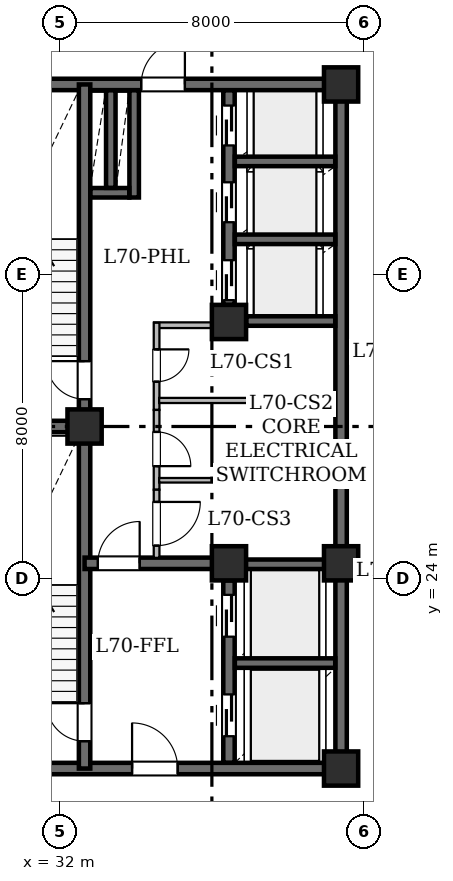
"""IFC4 building model, lengths in metres.
Left out: names, types, materials, properties, quantities, classifications, styles, units other than length and angle.
Written with IfcOpenShell. Run it as: python <this file> out.ifc"""

import sys

from ifc_helpers import new_model, si_unit, direction, frame, frame_2d, origin, origin_2d, place, context, subcontext, project, spatial, rectangle, hollow_rectangle, extrude, element, fill, save


model = new_model("IFC4")
c1 = context("Model", 3, precision=1e-05, world=origin(), true_north=direction((0.0, 1.0)))
c2 = subcontext(c1, "Body", "Model", "MODEL_VIEW")
j1 = project(units=[si_unit("LENGTHUNIT", "METRE"), si_unit("PLANEANGLEUNIT", "RADIAN")], contexts=[c1])
p1 = place(None, origin())
s1 = spatial("IfcSite", under=j1, at=p1, CompositionType="ELEMENT")
p2 = place(p1, origin())
s2 = spatial("IfcBuilding", under=s1, at=p2, CompositionType="ELEMENT")
p3 = place(p2, frame((0.0, 0.0, 273.65)))
s3 = spatial("IfcBuildingStorey", under=s2, at=p3, CompositionType="ELEMENT", Elevation=273.65)
for number, where, z_axis, x_axis in (
    (1, (32.65, 28.0, 0.0), (0.0, 0.0, 1.0), (1.0, 0.0, 0.0)),
    (2, (39.4, 19.0, 0.0), (0.0, 0.0, 1.0), (1.0, 0.0, 0.0)),
    (3, (36.45, 24.4, 0.0), (0.0, 0.0, 1.0), (1.0, 0.0, 0.0)),
    (4, (39.4, 24.4, 0.0), (0.0, 0.0, 1.0), (1.0, 0.0, 0.0)),
    (5, (36.45, 30.75, 0.0), (0.0, 0.0, 1.0), (1.0, 0.0, 0.0)),
    (6, (39.4, 37.0, 0.0), (0.0, 0.0, 1.0), (1.0, 0.0, 0.0)),
):
    element("IfcColumn", number, at=place(p3, frame(where, z_axis=z_axis, x_axis=x_axis)), inside=s3, PredefinedType="COLUMN", context=c2, shape_type="SweptSolid", body=[
        extrude(hollow_rectangle(XDim=0.9, YDim=0.9, WallThickness=0.045, at=origin_2d()), origin(), (0.0, 0.0, 1.0), 4.2),
    ])
p4 = place(p3, frame((29.0, 19.0, 0.0), z_axis=(0.0, 0.0, 1.0), x_axis=(1.0, 0.0, 0.0)))
e7 = element("IfcWall", 7, at=p4, inside=s3, PredefinedType="SHEAR", context=c2, shape_type="SweptSolid", body=[
    extrude(rectangle(XDim=10.4, YDim=0.3, at=frame_2d((5.2, 0.0))), origin(), (0.0, 0.0, 1.0), 3.78),
])
p5 = place(p4, frame((4.9, 0.0, 0.0)))
e8 = element("IfcOpeningElement", 8, at=p5, cuts=e7, PredefinedType="OPENING", context=c2, shape_type="SweptSolid", body=[
    extrude(rectangle(XDim=1.2, YDim=2.15, at=frame_2d((0.6, 1.075))), frame((0.0, 0.16, 0.0), z_axis=(0.0, -1.0, 0.0), x_axis=(1.0, 0.0, 0.0)), (0.0, 0.0, 1.0), 0.32),
])
p6 = place(p3, frame((29.0, 37.0, 0.0), z_axis=(0.0, 0.0, 1.0), x_axis=(1.0, 0.0, 0.0)))
e9 = element("IfcWall", 9, at=p6, inside=s3, PredefinedType="SHEAR", context=c2, shape_type="SweptSolid", body=[
    extrude(rectangle(XDim=10.4, YDim=0.3, at=frame_2d((5.2, 0.0))), origin(), (0.0, 0.0, 1.0), 3.78),
])
p7 = place(p6, frame((5.14, 0.0, 0.0)))
e10 = element("IfcOpeningElement", 10, at=p7, cuts=e9, PredefinedType="OPENING", context=c2, shape_type="SweptSolid", body=[
    extrude(rectangle(XDim=1.15, YDim=2.2, at=frame_2d((0.575, 1.1))), frame((0.0, 0.16, 0.0), z_axis=(0.0, -1.0, 0.0), x_axis=(1.0, 0.0, 0.0)), (0.0, 0.0, 1.0), 0.32),
])
p8 = place(p3, frame((39.4, 19.0, 0.0), z_axis=(0.0, 0.0, 1.0), x_axis=(0.0, 1.0, 0.0)))
e11 = element("IfcWall", 11, at=p8, inside=s3, PredefinedType="SHEAR", context=c2, shape_type="SweptSolid", body=[
    extrude(rectangle(XDim=5.4, YDim=0.3, at=frame_2d((2.7, 0.0))), origin(), (0.0, 0.0, 1.0), 3.78),
])
p9 = place(p3, frame((39.4, 24.4, 0.0), z_axis=(0.0, 0.0, 1.0), x_axis=(0.0, 1.0, 0.0)))
e12 = element("IfcWall", 12, at=p9, inside=s3, PredefinedType="SHEAR", context=c2, shape_type="SweptSolid", body=[
    extrude(rectangle(XDim=12.6, YDim=0.3, at=frame_2d((6.3, 0.0))), origin(), (0.0, 0.0, 1.0), 3.78),
])
p10 = place(p3, frame((32.65, 19.0, 0.0), z_axis=(0.0, 0.0, 1.0), x_axis=(0.0, 1.0, 0.0)))
e13 = element("IfcWall", 13, at=p10, inside=s3, PredefinedType="SHEAR", context=c2, shape_type="SweptSolid", body=[
    extrude(rectangle(XDim=9.0, YDim=0.3, at=frame_2d((4.5, 0.0))), origin(), (0.0, 0.0, 1.0), 3.78),
])
p11 = place(p10, frame((0.72, 0.0, 0.0)))
e14 = element("IfcOpeningElement", 14, at=p11, cuts=e13, PredefinedType="OPENING", context=c2, shape_type="SweptSolid", body=[
    extrude(rectangle(XDim=1.0, YDim=2.15, at=frame_2d((0.5, 1.075))), frame((0.0, 0.16, 0.0), z_axis=(0.0, -1.0, 0.0), x_axis=(1.0, 0.0, 0.0)), (0.0, 0.0, 1.0), 0.32),
])
p12 = place(p3, frame((32.65, 28.0, 0.0), z_axis=(0.0, 0.0, 1.0), x_axis=(0.0, 1.0, 0.0)))
e15 = element("IfcWall", 15, at=p12, inside=s3, PredefinedType="SHEAR", context=c2, shape_type="SweptSolid", body=[
    extrude(rectangle(XDim=9.0, YDim=0.3, at=frame_2d((4.5, 0.0))), origin(), (0.0, 0.0, 1.0), 3.78),
])
p13 = place(p12, frame((0.72, 0.0, 0.0)))
e16 = element("IfcOpeningElement", 16, at=p13, cuts=e15, PredefinedType="OPENING", context=c2, shape_type="SweptSolid", body=[
    extrude(rectangle(XDim=1.0, YDim=2.15, at=frame_2d((0.5, 1.075))), frame((0.0, 0.16, 0.0), z_axis=(0.0, -1.0, 0.0), x_axis=(1.0, 0.0, 0.0)), (0.0, 0.0, 1.0), 0.32),
])
p14 = place(p3, frame((29.0, 28.0, 0.0), z_axis=(0.0, 0.0, 1.0), x_axis=(1.0, 0.0, 0.0)))
e17 = element("IfcWall", 17, at=p14, inside=s3, PredefinedType="SHEAR", context=c2, shape_type="SweptSolid", body=[
    extrude(rectangle(XDim=3.65, YDim=0.3, at=frame_2d((1.825, 0.0))), origin(), (0.0, 0.0, 1.0), 3.78),
])
p15 = place(p3, frame((32.65, 24.4, 0.0), z_axis=(0.0, 0.0, 1.0), x_axis=(1.0, 0.0, 0.0)))
e18 = element("IfcWall", 18, at=p15, inside=s3, PredefinedType="SHEAR", context=c2, shape_type="SweptSolid", body=[
    extrude(rectangle(XDim=3.8, YDim=0.3, at=frame_2d((1.9, 0.0))), origin(), (0.0, 0.0, 1.0), 3.78),
])
p16 = place(p15, frame((0.35, 0.0, 0.0)))
e19 = element("IfcOpeningElement", 19, at=p16, cuts=e18, PredefinedType="OPENING", context=c2, shape_type="SweptSolid", body=[
    extrude(rectangle(XDim=1.1, YDim=2.15, at=frame_2d((0.55, 1.075))), frame((0.0, 0.16, 0.0), z_axis=(0.0, -1.0, 0.0), x_axis=(1.0, 0.0, 0.0)), (0.0, 0.0, 1.0), 0.32),
])
p17 = place(p3, frame((36.45, 19.154, 0.0), z_axis=(0.0, 0.0, 1.0), x_axis=(0.0, 1.0, 0.0)))
e20 = element("IfcWall", 20, at=p17, inside=s3, PredefinedType="SHEAR", context=c2, shape_type="SweptSolid", body=[
    extrude(rectangle(XDim=4.796, YDim=0.3, at=frame_2d((2.398, 0.0))), origin(), (0.0, 0.0, 1.0), 3.78),
])
p18 = place(p17, frame((0.696, 0.0, 0.0)))
e21 = element("IfcOpeningElement", 21, at=p18, cuts=e20, PredefinedType="OPENING", context=c2, shape_type="SweptSolid", body=[
    extrude(rectangle(XDim=1.1, YDim=2.15, at=frame_2d((0.55, 1.075))), frame((0.0, 0.16, 0.0), z_axis=(0.0, -1.0, 0.0), x_axis=(1.0, 0.0, 0.0)), (0.0, 0.0, 1.0), 0.32),
])
p19 = place(p17, frame((3.316, 0.0, 0.0)))
e22 = element("IfcOpeningElement", 22, at=p19, cuts=e20, PredefinedType="OPENING", context=c2, shape_type="SweptSolid", body=[
    extrude(rectangle(XDim=1.1, YDim=2.15, at=frame_2d((0.55, 1.075))), frame((0.0, 0.16, 0.0), z_axis=(0.0, -1.0, 0.0), x_axis=(1.0, 0.0, 0.0)), (0.0, 0.0, 1.0), 0.32),
])
p20 = place(p3, frame((36.45, 31.2, 0.0), z_axis=(0.0, 0.0, 1.0), x_axis=(0.0, 1.0, 0.0)))
e23 = element("IfcWall", 23, at=p20, inside=s3, PredefinedType="SHEAR", context=c2, shape_type="SweptSolid", body=[
    extrude(rectangle(XDim=5.646, YDim=0.3, at=frame_2d((2.823, 0.0))), origin(), (0.0, 0.0, 1.0), 3.78),
])
p21 = place(p20, frame((0.125, 0.0, 0.0)))
e24 = element("IfcOpeningElement", 24, at=p21, cuts=e23, PredefinedType="OPENING", context=c2, shape_type="SweptSolid", body=[
    extrude(rectangle(XDim=1.05, YDim=2.15, at=frame_2d((0.525, 1.075))), frame((0.0, 0.16, 0.0), z_axis=(0.0, -1.0, 0.0), x_axis=(1.0, 0.0, 0.0)), (0.0, 0.0, 1.0), 0.32),
])
p22 = place(p20, frame((2.175, 0.0, 0.0)))
e25 = element("IfcOpeningElement", 25, at=p22, cuts=e23, PredefinedType="OPENING", context=c2, shape_type="SweptSolid", body=[
    extrude(rectangle(XDim=1.05, YDim=2.15, at=frame_2d((0.525, 1.075))), frame((0.0, 0.16, 0.0), z_axis=(0.0, -1.0, 0.0), x_axis=(1.0, 0.0, 0.0)), (0.0, 0.0, 1.0), 0.32),
])
p23 = place(p20, frame((4.195, 0.0, 0.0)))
e26 = element("IfcOpeningElement", 26, at=p23, cuts=e23, PredefinedType="OPENING", context=c2, shape_type="SweptSolid", body=[
    extrude(rectangle(XDim=1.05, YDim=2.15, at=frame_2d((0.525, 1.075))), frame((0.0, 0.16, 0.0), z_axis=(0.0, -1.0, 0.0), x_axis=(1.0, 0.0, 0.0)), (0.0, 0.0, 1.0), 0.32),
])
for number, where, z_axis, x_axis in (
    (27, (36.604, 21.775, 0.0), (0.0, 0.0, 1.0), (1.0, 0.0, 0.0)),
    (28, (36.604, 24.375, 0.0), (0.0, 0.0, 1.0), (1.0, 0.0, 0.0)),
):
    element("IfcWall", number, at=place(p3, frame(where, z_axis=z_axis, x_axis=x_axis)), inside=s3, PredefinedType="SHEAR", context=c2, shape_type="SweptSolid", body=[
        extrude(rectangle(XDim=2.642, YDim=0.25, at=frame_2d((1.321, 0.0))), origin(), (0.0, 0.0, 1.0), 3.78),
    ])
p24 = place(p3, frame((36.904, 30.775, 0.0), z_axis=(0.0, 0.0, 1.0), x_axis=(1.0, 0.0, 0.0)))
e29 = element("IfcWall", 29, at=p24, inside=s3, PredefinedType="SHEAR", context=c2, shape_type="SweptSolid", body=[
    extrude(rectangle(XDim=2.342, YDim=0.25, at=frame_2d((1.171, 0.0))), origin(), (0.0, 0.0, 1.0), 3.78),
])
for number, where, z_axis, x_axis in (
    (30, (36.604, 32.925, 0.0), (0.0, 0.0, 1.0), (1.0, 0.0, 0.0)),
    (31, (36.604, 34.975, 0.0), (0.0, 0.0, 1.0), (1.0, 0.0, 0.0)),
):
    element("IfcWall", number, at=place(p3, frame(where, z_axis=z_axis, x_axis=x_axis)), inside=s3, PredefinedType="SHEAR", context=c2, shape_type="SweptSolid", body=[
        extrude(rectangle(XDim=2.642, YDim=0.25, at=frame_2d((1.321, 0.0))), origin(), (0.0, 0.0, 1.0), 3.78),
    ])
p25 = place(p3, frame((33.955, 34.025, 0.0), z_axis=(0.0, 0.0, 1.0), x_axis=(0.0, 1.0, 0.0)))
e32 = element("IfcWall", 32, at=p25, inside=s3, PredefinedType="SHEAR", context=c2, shape_type="SweptSolid", body=[
    extrude(rectangle(XDim=2.821, YDim=0.25, at=frame_2d((1.411, 0.0))), origin(), (0.0, 0.0, 1.0), 3.78),
])
p26 = place(p3, frame((32.804, 34.15, 0.0), z_axis=(0.0, 0.0, 1.0), x_axis=(1.0, 0.0, 0.0)))
e33 = element("IfcWall", 33, at=p26, inside=s3, PredefinedType="SHEAR", context=c2, shape_type="SweptSolid", body=[
    extrude(rectangle(XDim=1.022, YDim=0.25, at=frame_2d((0.511, 0.0))), origin(), (0.0, 0.0, 1.0), 3.78),
])
p27 = place(p3, frame((33.34, 34.279, 0.0), z_axis=(0.0, 0.0, 1.0), x_axis=(0.0, 1.0, 0.0)))
e34 = element("IfcWall", 34, at=p27, inside=s3, PredefinedType="SHEAR", context=c2, shape_type="SweptSolid", body=[
    extrude(rectangle(XDim=2.567, YDim=0.25, at=frame_2d((1.283, 0.0))), origin(), (0.0, 0.0, 1.0), 3.78),
])
p28 = place(p3, frame((36.3, 30.665, 0.0), z_axis=(0.0, 0.0, 1.0), x_axis=(-1.0, 0.0, 0.0)))
e35 = element("IfcWall", 35, at=p28, inside=s3, PredefinedType="STANDARD", context=c2, shape_type="SweptSolid", body=[
    extrude(rectangle(XDim=1.82, YDim=0.15, at=frame_2d((0.91, 0.0))), origin(), (0.0, 0.0, 1.0), 3.78),
])
p29 = place(p3, frame((34.545, 30.73, 0.0), z_axis=(0.0, 0.0, 1.0), x_axis=(0.0, -1.0, 0.0)))
e36 = element("IfcWall", 36, at=p29, inside=s3, PredefinedType="STANDARD", context=c2, shape_type="SweptSolid", body=[
    extrude(rectangle(XDim=2.294, YDim=0.15, at=frame_2d((1.147, 0.0))), origin(), (0.0, 0.0, 1.0), 3.78),
])
p30 = place(p29, frame((0.701, 0.0, 0.0)))
e37 = element("IfcOpeningElement", 37, at=p30, cuts=e36, PredefinedType="OPENING", context=c2, shape_type="SweptSolid", body=[
    extrude(rectangle(XDim=0.85, YDim=2.1, at=frame_2d((0.425, 1.05))), frame((0.0, 0.085, 0.0), z_axis=(0.0, -1.0, 0.0), x_axis=(1.0, 0.0, 0.0)), (0.0, 0.0, 1.0), 0.17),
])
p31 = place(p3, frame((34.545, 28.436, 0.0), z_axis=(0.0, 0.0, 1.0), x_axis=(0.0, -1.0, 0.0)))
e38 = element("IfcWall", 38, at=p31, inside=s3, PredefinedType="STANDARD", context=c2, shape_type="SweptSolid", body=[
    extrude(rectangle(XDim=2.1, YDim=0.15, at=frame_2d((1.05, 0.0))), origin(), (0.0, 0.0, 1.0), 3.78),
])
p32 = place(p31, frame((0.579, 0.0, 0.0)))
e39 = element("IfcOpeningElement", 39, at=p32, cuts=e38, PredefinedType="OPENING", context=c2, shape_type="SweptSolid", body=[
    extrude(rectangle(XDim=0.9, YDim=2.1, at=frame_2d((0.45, 1.05))), frame((0.0, 0.085, 0.0), z_axis=(0.0, -1.0, 0.0), x_axis=(1.0, 0.0, 0.0)), (0.0, 0.0, 1.0), 0.17),
])
p33 = place(p3, frame((34.545, 26.336, 0.0), z_axis=(0.0, 0.0, 1.0), x_axis=(0.0, -1.0, 0.0)))
e40 = element("IfcWall", 40, at=p33, inside=s3, PredefinedType="STANDARD", context=c2, shape_type="SweptSolid", body=[
    extrude(rectangle(XDim=1.792, YDim=0.15, at=frame_2d((0.896, 0.0))), origin(), (0.0, 0.0, 1.0), 3.78),
])
p34 = place(p33, frame((0.321, 0.0, 0.0)))
e41 = element("IfcOpeningElement", 41, at=p34, cuts=e40, PredefinedType="OPENING", context=c2, shape_type="SweptSolid", body=[
    extrude(rectangle(XDim=1.15, YDim=2.2, at=frame_2d((0.575, 1.1))), frame((0.0, 0.085, 0.0), z_axis=(0.0, -1.0, 0.0), x_axis=(1.0, 0.0, 0.0)), (0.0, 0.0, 1.0), 0.17),
])
p35 = place(p3, frame((39.256, 28.685, 0.0), z_axis=(0.0, 0.0, 1.0), x_axis=(-1.0, 0.0, 0.0)))
e42 = element("IfcWall", 42, at=p35, inside=s3, PredefinedType="PARTITIONING", context=c2, shape_type="SweptSolid", body=[
    extrude(rectangle(XDim=4.644, YDim=0.135, at=frame_2d((2.322, 0.0))), origin(), (0.0, 0.0, 1.0), 3.78),
])
p36 = place(p3, frame((39.256, 26.585, 0.0), z_axis=(0.0, 0.0, 1.0), x_axis=(-1.0, 0.0, 0.0)))
e43 = element("IfcWall", 43, at=p36, inside=s3, PredefinedType="PARTITIONING", context=c2, shape_type="SweptSolid", body=[
    extrude(rectangle(XDim=4.644, YDim=0.12, at=frame_2d((2.322, 0.0))), origin(), (0.0, 0.0, 1.0), 3.78),
])
p37 = place(p11, origin())
e44 = element("IfcDoor", 44, at=p37, inside=s3, OperationType="SINGLE_SWING_RIGHT", PredefinedType="DOOR", context=c2, shape_type="SweptSolid", body=[
    extrude(rectangle(XDim=1.0, YDim=2.15, at=frame_2d((0.5, 1.075))), frame((0.0, 0.025, 0.0), z_axis=(0.0, -1.0, 0.0), x_axis=(1.0, 0.0, 0.0)), (0.0, 0.0, 1.0), 0.05),
])
fill(e14, e44)
p38 = place(p13, origin())
e45 = element("IfcDoor", 45, at=p38, inside=s3, OperationType="SINGLE_SWING_RIGHT", PredefinedType="DOOR", context=c2, shape_type="SweptSolid", body=[
    extrude(rectangle(XDim=1.0, YDim=2.15, at=frame_2d((0.5, 1.075))), frame((0.0, 0.025, 0.0), z_axis=(0.0, -1.0, 0.0), x_axis=(1.0, 0.0, 0.0)), (0.0, 0.0, 1.0), 0.05),
])
fill(e16, e45)
p39 = place(p16, origin())
e46 = element("IfcDoor", 46, at=p39, inside=s3, OperationType="SINGLE_SWING_RIGHT", PredefinedType="DOOR", context=c2, shape_type="SweptSolid", body=[
    extrude(rectangle(XDim=1.1, YDim=2.15, at=frame_2d((0.55, 1.075))), frame((0.0, 0.025, 0.0), z_axis=(0.0, -1.0, 0.0), x_axis=(1.0, 0.0, 0.0)), (0.0, 0.0, 1.0), 0.05),
])
fill(e19, e46)
p40 = place(p5, origin())
e47 = element("IfcDoor", 47, at=p40, inside=s3, OperationType="SINGLE_SWING_LEFT", PredefinedType="DOOR", context=c2, shape_type="SweptSolid", body=[
    extrude(rectangle(XDim=1.2, YDim=2.15, at=frame_2d((0.6, 1.075))), frame((0.0, 0.025, 0.0), z_axis=(0.0, -1.0, 0.0), x_axis=(1.0, 0.0, 0.0)), (0.0, 0.0, 1.0), 0.05),
])
fill(e8, e47)
p41 = place(p7, origin())
e48 = element("IfcDoor", 48, at=p41, inside=s3, OperationType="SINGLE_SWING_RIGHT", PredefinedType="DOOR", context=c2, shape_type="SweptSolid", body=[
    extrude(rectangle(XDim=1.15, YDim=2.2, at=frame_2d((0.575, 1.1))), frame((0.0, 0.025, 0.0), z_axis=(0.0, -1.0, 0.0), x_axis=(1.0, 0.0, 0.0)), (0.0, 0.0, 1.0), 0.05),
])
fill(e10, e48)
p42 = place(p18, origin())
e49 = element("IfcDoor", 49, at=p42, inside=s3, OperationType="SLIDING_TO_LEFT", PredefinedType="DOOR", context=c2, shape_type="SweptSolid", body=[
    extrude(rectangle(XDim=1.1, YDim=2.15, at=frame_2d((0.55, 1.075))), frame((0.0, 0.025, 0.0), z_axis=(0.0, -1.0, 0.0), x_axis=(1.0, 0.0, 0.0)), (0.0, 0.0, 1.0), 0.05),
])
fill(e21, e49)
p43 = place(p19, origin())
e50 = element("IfcDoor", 50, at=p43, inside=s3, OperationType="SLIDING_TO_LEFT", PredefinedType="DOOR", context=c2, shape_type="SweptSolid", body=[
    extrude(rectangle(XDim=1.1, YDim=2.15, at=frame_2d((0.55, 1.075))), frame((0.0, 0.025, 0.0), z_axis=(0.0, -1.0, 0.0), x_axis=(1.0, 0.0, 0.0)), (0.0, 0.0, 1.0), 0.05),
])
fill(e22, e50)
p44 = place(p21, origin())
e51 = element("IfcDoor", 51, at=p44, inside=s3, OperationType="SLIDING_TO_LEFT", PredefinedType="DOOR", context=c2, shape_type="SweptSolid", body=[
    extrude(rectangle(XDim=1.05, YDim=2.15, at=frame_2d((0.525, 1.075))), frame((0.0, 0.025, 0.0), z_axis=(0.0, -1.0, 0.0), x_axis=(1.0, 0.0, 0.0)), (0.0, 0.0, 1.0), 0.05),
])
fill(e24, e51)
p45 = place(p22, origin())
e52 = element("IfcDoor", 52, at=p45, inside=s3, OperationType="SLIDING_TO_LEFT", PredefinedType="DOOR", context=c2, shape_type="SweptSolid", body=[
    extrude(rectangle(XDim=1.05, YDim=2.15, at=frame_2d((0.525, 1.075))), frame((0.0, 0.025, 0.0), z_axis=(0.0, -1.0, 0.0), x_axis=(1.0, 0.0, 0.0)), (0.0, 0.0, 1.0), 0.05),
])
fill(e25, e52)
p46 = place(p23, origin())
e53 = element("IfcDoor", 53, at=p46, inside=s3, OperationType="SLIDING_TO_LEFT", PredefinedType="DOOR", context=c2, shape_type="SweptSolid", body=[
    extrude(rectangle(XDim=1.05, YDim=2.15, at=frame_2d((0.525, 1.075))), frame((0.0, 0.025, 0.0), z_axis=(0.0, -1.0, 0.0), x_axis=(1.0, 0.0, 0.0)), (0.0, 0.0, 1.0), 0.05),
])
fill(e26, e53)
p47 = place(p30, origin())
e54 = element("IfcDoor", 54, at=p47, inside=s3, OperationType="SINGLE_SWING_LEFT", PredefinedType="DOOR", context=c2, shape_type="SweptSolid", body=[
    extrude(rectangle(XDim=0.85, YDim=2.1, at=frame_2d((0.425, 1.05))), frame((0.0, 0.025, 0.0), z_axis=(0.0, -1.0, 0.0), x_axis=(1.0, 0.0, 0.0)), (0.0, 0.0, 1.0), 0.05),
])
fill(e37, e54)
p48 = place(p32, origin())
e55 = element("IfcDoor", 55, at=p48, inside=s3, OperationType="SINGLE_SWING_RIGHT", PredefinedType="DOOR", context=c2, shape_type="SweptSolid", body=[
    extrude(rectangle(XDim=0.9, YDim=2.1, at=frame_2d((0.45, 1.05))), frame((0.0, 0.025, 0.0), z_axis=(0.0, -1.0, 0.0), x_axis=(1.0, 0.0, 0.0)), (0.0, 0.0, 1.0), 0.05),
])
fill(e39, e55)
p49 = place(p34, origin())
e56 = element("IfcDoor", 56, at=p49, inside=s3, OperationType="SINGLE_SWING_LEFT", PredefinedType="DOOR", context=c2, shape_type="SweptSolid", body=[
    extrude(rectangle(XDim=1.15, YDim=2.2, at=frame_2d((0.575, 1.1))), frame((0.0, 0.025, 0.0), z_axis=(0.0, -1.0, 0.0), x_axis=(1.0, 0.0, 0.0)), (0.0, 0.0, 1.0), 0.05),
])
fill(e41, e56)
save(model, sys.argv[1])
